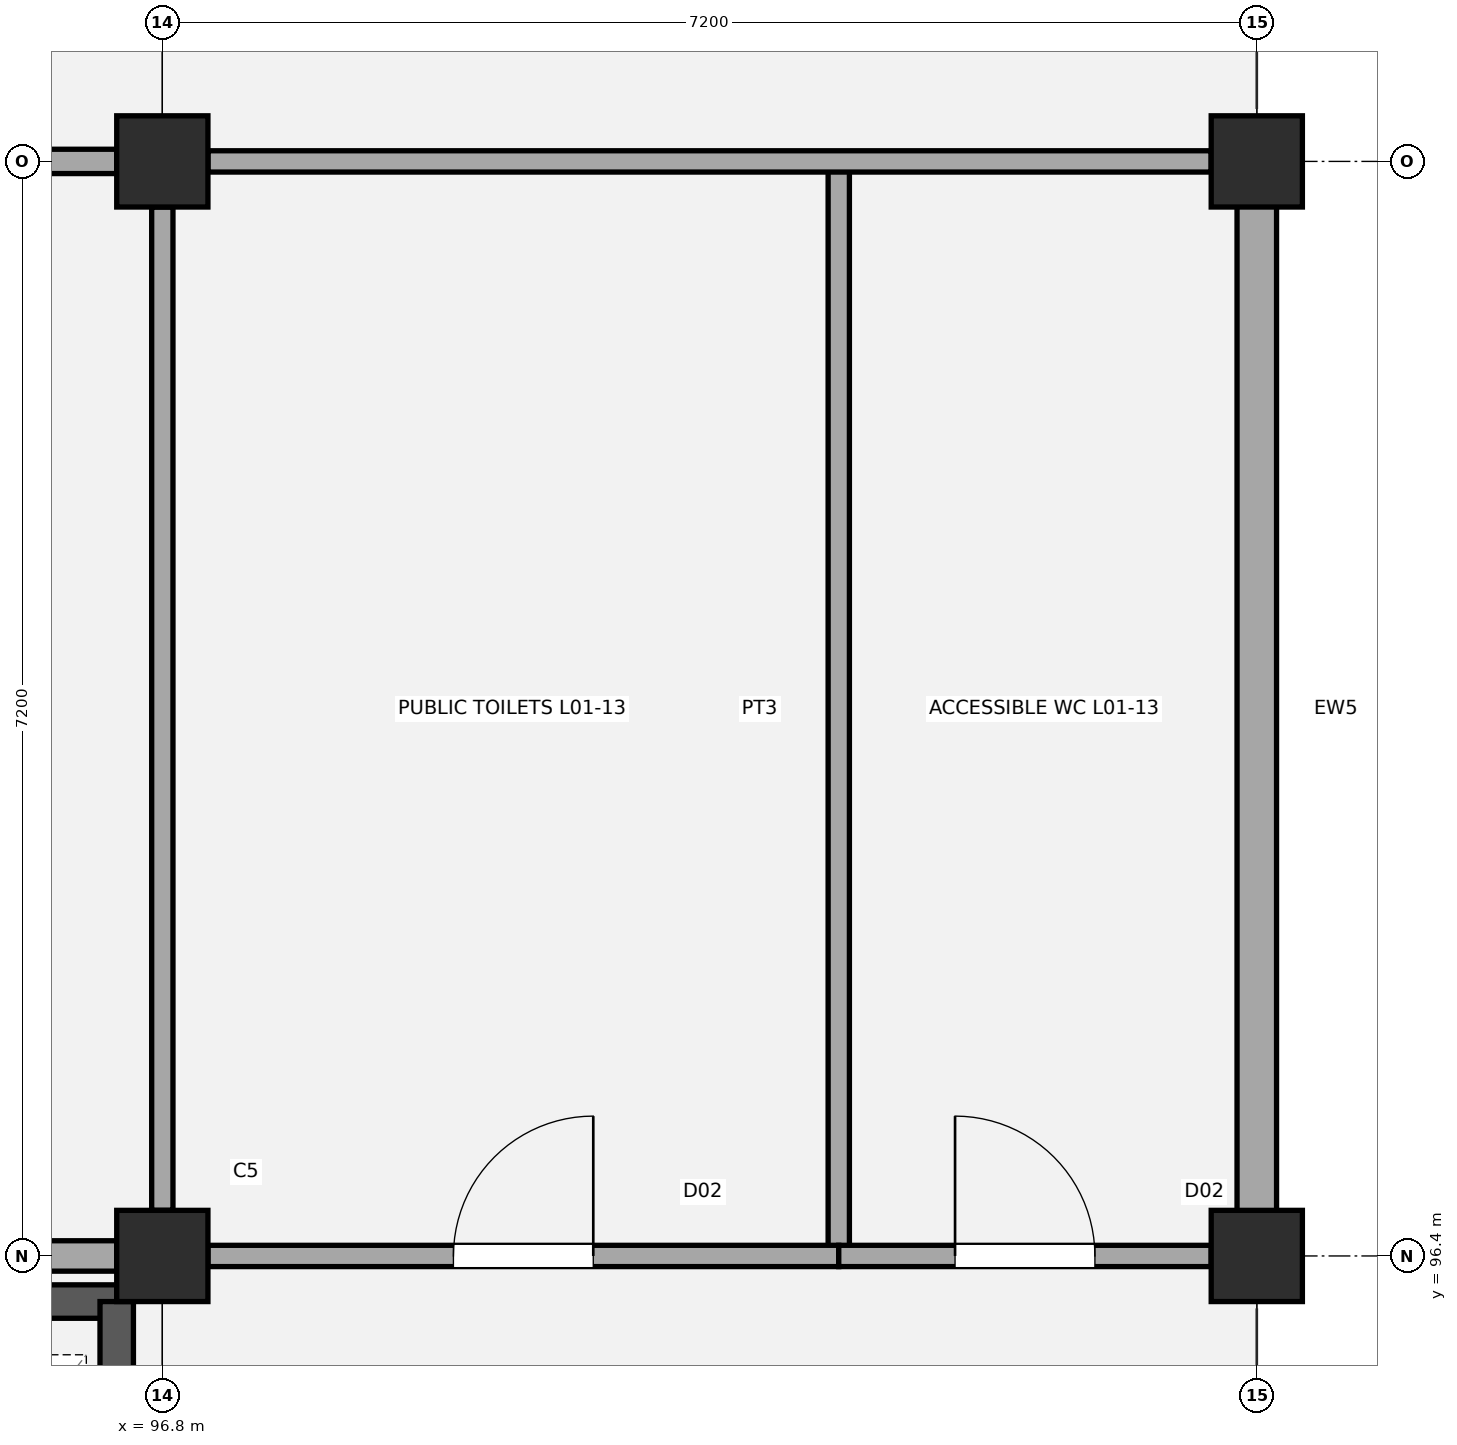
"""IFC4 building model, lengths in metres.
Left out: names, types, materials, properties, quantities, classifications, styles, units other than length and angle.
Written with IfcOpenShell. Run it as: python <this file> out.ifc"""

import sys

from ifc_helpers import new_model, si_unit, direction, frame, frame_2d, origin, origin_2d, place, context, subcontext, project, spatial, rectangle, extrude, element, fill, save


model = new_model("IFC4")
c1 = context("Model", 3, precision=1e-05, world=origin(), true_north=direction((0.0, 1.0)))
c2 = subcontext(c1, "Body", "Model", "MODEL_VIEW")
j1 = project(units=[si_unit("LENGTHUNIT", "METRE"), si_unit("PLANEANGLEUNIT", "RADIAN")], contexts=[c1])
p1 = place(None, origin())
s1 = spatial("IfcSite", under=j1, at=p1, CompositionType="ELEMENT")
p2 = place(p1, origin())
s2 = spatial("IfcBuilding", under=s1, at=p2, CompositionType="ELEMENT")
p3 = place(p2, frame((0.0, 0.0, 4.68)))
s3 = spatial("IfcBuildingStorey", under=s2, at=p3, CompositionType="ELEMENT", Elevation=4.68)
for number, where, z_axis, x_axis in (
    (1, (96.8, 96.4, 0.0), (0.0, 0.0, 1.0), (1.0, 0.0, 0.0)),
    (2, (96.8, 103.6, 0.0), (0.0, 0.0, 1.0), (1.0, 0.0, 0.0)),
    (3, (104.0, 96.4, 0.0), (0.0, 0.0, 1.0), (1.0, 0.0, 0.0)),
    (4, (104.0, 103.6, 0.0), (0.0, 0.0, 1.0), (1.0, 0.0, 0.0)),
):
    element("IfcColumn", number, at=place(p3, frame(where, z_axis=z_axis, x_axis=x_axis)), inside=s3, PredefinedType="COLUMN", context=c2, shape_type="SweptSolid", body=[
        extrude(rectangle(XDim=0.6, YDim=0.6, at=origin_2d()), origin(), (0.0, 0.0, 1.0), 4.5),
    ])
p4 = place(p3, frame((104.0, 103.305, 0.0), z_axis=(0.0, 0.0, 1.0), x_axis=(0.0, -1.0, 0.0)))
e5 = element("IfcWall", 5, at=p4, inside=s3, PredefinedType="STANDARD", context=c2, shape_type="SweptSolid", body=[
    extrude(rectangle(XDim=6.61, YDim=0.26, at=frame_2d((3.305, 0.0))), origin(), (0.0, 0.0, 1.0), 3.49),
])
p5 = place(p3, frame((94.14, 96.1, 0.0), z_axis=(0.0, 0.0, 1.0), x_axis=(1.0, 0.0, 0.0)))
e6 = element("IfcWall", 6, at=p5, inside=s3, PredefinedType="SHEAR", context=c2, shape_type="SweptSolid", body=[
    extrude(rectangle(XDim=2.36, YDim=0.22, at=frame_2d((1.18, 0.0))), origin(), (0.0, 0.0, 1.0), 4.2),
])
p6 = place(p3, frame((96.5, 93.0, 0.0), z_axis=(0.0, 0.0, 1.0), x_axis=(0.0, 1.0, 0.0)))
e7 = element("IfcWall", 7, at=p6, inside=s3, PredefinedType="SHEAR", context=c2, shape_type="SweptSolid", body=[
    extrude(rectangle(XDim=3.1, YDim=0.22, at=frame_2d((1.55, 0.0))), origin(), (0.0, 0.0, 1.0), 4.2),
])
p7 = place(p3, frame((89.9, 96.4, 0.0), z_axis=(0.0, 0.0, 1.0), x_axis=(1.0, 0.0, 0.0)))
e8 = element("IfcWall", 8, at=p7, inside=s3, PredefinedType="PARTITIONING", context=c2, shape_type="SweptSolid", body=[
    extrude(rectangle(XDim=6.6, YDim=0.2, at=frame_2d((3.3, 0.0))), origin(), (0.0, 0.0, 1.0), 3.59),
])
p8 = place(p3, frame((101.25, 96.4, 0.0), z_axis=(0.0, 0.0, 1.0), x_axis=(0.0, 1.0, 0.0)))
e9 = element("IfcWall", 9, at=p8, inside=s3, PredefinedType="PARTITIONING", context=c2, shape_type="SweptSolid", body=[
    extrude(rectangle(XDim=7.2, YDim=0.14, at=frame_2d((3.6, 0.0))), origin(), (0.0, 0.0, 1.0), 3.62),
])
p9 = place(p3, frame((97.1, 96.4, 0.0), z_axis=(0.0, 0.0, 1.0), x_axis=(1.0, 0.0, 0.0)))
e10 = element("IfcWall", 10, at=p9, inside=s3, PredefinedType="PARTITIONING", context=c2, shape_type="SweptSolid", body=[
    extrude(rectangle(XDim=4.15, YDim=0.14, at=frame_2d((2.075, 0.0))), origin(), (0.0, 0.0, 1.0), 3.54),
])
p10 = place(p9, frame((1.615, 0.0, 0.0)))
e11 = element("IfcOpeningElement", 11, at=p10, cuts=e10, PredefinedType="OPENING", context=c2, shape_type="SweptSolid", body=[
    extrude(rectangle(XDim=0.92, YDim=2.08, at=frame_2d((0.46, 1.04))), frame((0.0, 0.08, 0.0), z_axis=(0.0, -1.0, 0.0), x_axis=(1.0, 0.0, 0.0)), (0.0, 0.0, 1.0), 0.16),
])
p11 = place(p3, frame((101.25, 96.4, 0.0), z_axis=(0.0, 0.0, 1.0), x_axis=(1.0, 0.0, 0.0)))
e12 = element("IfcWall", 12, at=p11, inside=s3, PredefinedType="PARTITIONING", context=c2, shape_type="SweptSolid", body=[
    extrude(rectangle(XDim=2.45, YDim=0.14, at=frame_2d((1.225, 0.0))), origin(), (0.0, 0.0, 1.0), 3.54),
])
p12 = place(p11, frame((0.765, 0.0, 0.0)))
e13 = element("IfcOpeningElement", 13, at=p12, cuts=e12, PredefinedType="OPENING", context=c2, shape_type="SweptSolid", body=[
    extrude(rectangle(XDim=0.92, YDim=2.08, at=frame_2d((0.46, 1.04))), frame((0.0, 0.08, 0.0), z_axis=(0.0, -1.0, 0.0), x_axis=(1.0, 0.0, 0.0)), (0.0, 0.0, 1.0), 0.16),
])
p13 = place(p3, frame((97.1, 103.6, 0.0), z_axis=(0.0, 0.0, 1.0), x_axis=(1.0, 0.0, 0.0)))
e14 = element("IfcWall", 14, at=p13, inside=s3, PredefinedType="PARTITIONING", context=c2, shape_type="SweptSolid", body=[
    extrude(rectangle(XDim=6.6, YDim=0.14, at=frame_2d((3.3, 0.0))), origin(), (0.0, 0.0, 1.0), 3.59),
])
p14 = place(p3, frame((96.8, 96.7, 0.0), z_axis=(0.0, 0.0, 1.0), x_axis=(0.0, 1.0, 0.0)))
e15 = element("IfcWall", 15, at=p14, inside=s3, PredefinedType="PARTITIONING", context=c2, shape_type="SweptSolid", body=[
    extrude(rectangle(XDim=6.6, YDim=0.14, at=frame_2d((3.3, 0.0))), origin(), (0.0, 0.0, 1.0), 3.59),
])
p15 = place(p3, frame((89.9, 103.6, 0.0), z_axis=(0.0, 0.0, 1.0), x_axis=(1.0, 0.0, 0.0)))
e16 = element("IfcWall", 16, at=p15, inside=s3, PredefinedType="PARTITIONING", context=c2, shape_type="SweptSolid", body=[
    extrude(rectangle(XDim=6.6, YDim=0.16, at=frame_2d((3.3, 0.0))), origin(), (0.0, 0.0, 1.0), 3.54),
])
p16 = place(p15, frame((2.37, 0.0, 0.0)))
e17 = element("IfcOpeningElement", 17, at=p16, cuts=e16, PredefinedType="OPENING", context=c2, shape_type="SweptSolid", body=[
    extrude(rectangle(XDim=1.86, YDim=2.26, at=frame_2d((0.93, 1.13))), frame((0.0, 0.09, 0.0), z_axis=(0.0, -1.0, 0.0), x_axis=(1.0, 0.0, 0.0)), (0.0, 0.0, 1.0), 0.18),
])
p17 = place(p10, origin())
e18 = element("IfcDoor", 18, at=p17, inside=s3, OperationType="SINGLE_SWING_RIGHT", PredefinedType="DOOR", context=c2, shape_type="SweptSolid", body=[
    extrude(rectangle(XDim=0.92, YDim=2.08, at=frame_2d((0.46, 1.04))), frame((0.0, 0.025, 0.0), z_axis=(0.0, -1.0, 0.0), x_axis=(1.0, 0.0, 0.0)), (0.0, 0.0, 1.0), 0.05),
])
fill(e11, e18)
p18 = place(p12, origin())
e19 = element("IfcDoor", 19, at=p18, inside=s3, OperationType="SINGLE_SWING_LEFT", PredefinedType="DOOR", context=c2, shape_type="SweptSolid", body=[
    extrude(rectangle(XDim=0.92, YDim=2.08, at=frame_2d((0.46, 1.04))), frame((0.0, 0.025, 0.0), z_axis=(0.0, -1.0, 0.0), x_axis=(1.0, 0.0, 0.0)), (0.0, 0.0, 1.0), 0.05),
])
fill(e13, e19)
save(model, sys.argv[1])
